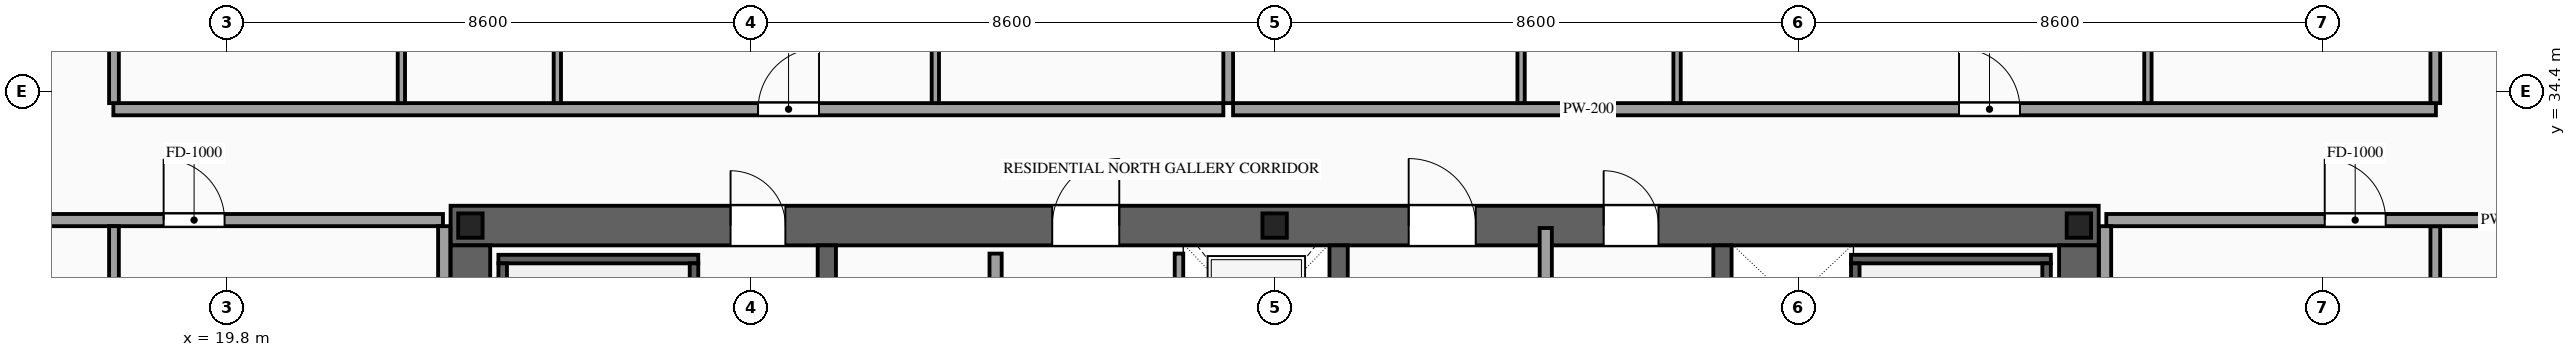
"""IFC4 building model, lengths in metres.
Left out: names, types, materials, properties, quantities, classifications, styles, units other than length and angle.
Written with IfcOpenShell. Run it as: python <this file> out.ifc"""

import sys

from ifc_helpers import new_model, si_unit, direction, frame, frame_2d, origin, origin_2d, place, context, subcontext, project, spatial, rectangle, i_section, extrude, source, transform, mapped, element, fill, save


model = new_model("IFC4")
c1 = context("Model", 3, precision=1e-05, world=origin(), true_north=direction((0.0, 1.0)))
c2 = subcontext(c1, "Body", "Model", "MODEL_VIEW")
j1 = project(units=[si_unit("LENGTHUNIT", "METRE"), si_unit("PLANEANGLEUNIT", "RADIAN")], contexts=[c1])
p1 = place(None, origin())
s1 = spatial("IfcSite", under=j1, at=p1, CompositionType="ELEMENT")
p2 = place(p1, origin())
s2 = spatial("IfcBuilding", under=s1, at=p2, CompositionType="ELEMENT")
p3 = place(p2, frame((0.0, 0.0, 212.5)))
s3 = spatial("IfcBuildingStorey", under=s2, at=p3, CompositionType="ELEMENT", Elevation=212.5)
p4 = place(p3, frame((23.475, 32.2, 0.0), z_axis=(0.0, 0.0, 1.0), x_axis=(1.0, 0.0, 0.0)))
e1 = element("IfcWall", 1, at=p4, inside=s3, PredefinedType="SHEAR", context=c2, shape_type="SweptSolid", body=[
    extrude(rectangle(XDim=27.05, YDim=0.65, at=frame_2d((13.525, 0.0))), origin(), (0.0, 0.0, 1.0), 3.5),
])
p5 = place(p4, frame((4.595, 0.0, 0.0)))
e2 = element("IfcOpeningElement", 2, at=p5, cuts=e1, PredefinedType="OPENING", context=c2, shape_type="SweptSolid", body=[
    extrude(rectangle(XDim=0.9, YDim=2.15, at=frame_2d((0.45, 1.075))), frame((0.0, 0.34, 0.0), z_axis=(0.0, -1.0, 0.0), x_axis=(1.0, 0.0, 0.0)), (0.0, 0.0, 1.0), 0.68),
])
p6 = place(p4, frame((9.875, 0.0, 0.0)))
e3 = element("IfcOpeningElement", 3, at=p6, cuts=e1, PredefinedType="OPENING", context=c2, shape_type="SweptSolid", body=[
    extrude(rectangle(XDim=1.1, YDim=2.2, at=frame_2d((0.55, 1.1))), frame((0.0, 0.34, 0.0), z_axis=(0.0, -1.0, 0.0), x_axis=(1.0, 0.0, 0.0)), (0.0, 0.0, 1.0), 0.68),
])
p7 = place(p4, frame((15.725, 0.0, 0.0)))
e4 = element("IfcOpeningElement", 4, at=p7, cuts=e1, PredefinedType="OPENING", context=c2, shape_type="SweptSolid", body=[
    extrude(rectangle(XDim=1.1, YDim=2.2, at=frame_2d((0.55, 1.1))), frame((0.0, 0.34, 0.0), z_axis=(0.0, -1.0, 0.0), x_axis=(1.0, 0.0, 0.0)), (0.0, 0.0, 1.0), 0.68),
])
p8 = place(p4, frame((18.925, 0.0, 0.0)))
e5 = element("IfcOpeningElement", 5, at=p8, cuts=e1, PredefinedType="OPENING", context=c2, shape_type="SweptSolid", body=[
    extrude(rectangle(XDim=0.9, YDim=2.15, at=frame_2d((0.45, 1.075))), frame((0.0, 0.34, 0.0), z_axis=(0.0, -1.0, 0.0), x_axis=(1.0, 0.0, 0.0)), (0.0, 0.0, 1.0), 0.68),
])
m1 = source(origin(), c2, "Body", "SweptSolid", [
    extrude(rectangle(XDim=12.15, YDim=0.65, at=frame_2d((6.075, 0.0))), origin(), (0.0, 0.0, 1.0), 3.5),
])
for number, where, z_axis, x_axis in (
    (6, (23.8, 19.725, 0.0), (0.0, 0.0, 1.0), (0.0, 1.0, 0.0)),
    (7, (50.2, 19.725, 0.0), (0.0, 0.0, 1.0), (0.0, 1.0, 0.0)),
):
    element("IfcWall", number, at=place(p3, frame(where, z_axis=z_axis, x_axis=x_axis)), inside=s3, PredefinedType="SHEAR", context=c2, shape_type="MappedRepresentation", body=[
        mapped(m1, transform((0.0, 0.0, 0.0), scale=1.0)),
    ])
m2 = source(origin(), c2, "Body", "SweptSolid", [
    extrude(rectangle(XDim=12.15, YDim=0.3, at=frame_2d((6.075, 0.0))), origin(), (0.0, 0.0, 1.0), 3.5),
])
for number, where, z_axis, x_axis in (
    (8, (29.65, 19.725, 0.0), (0.0, 0.0, 1.0), (0.0, 1.0, 0.0)),
    (9, (38.05, 19.725, 0.0), (0.0, 0.0, 1.0), (0.0, 1.0, 0.0)),
    (10, (44.35, 19.725, 0.0), (0.0, 0.0, 1.0), (0.0, 1.0, 0.0)),
):
    element("IfcWall", number, at=place(p3, frame(where, z_axis=z_axis, x_axis=x_axis)), inside=s3, PredefinedType="SOLIDWALL", context=c2, shape_type="MappedRepresentation", body=[
        mapped(m2, transform((0.0, 0.0, 0.0), scale=1.0)),
    ])
m3 = source(origin(), c2, "Body", "SweptSolid", [
    extrude(i_section(OverallWidth=0.4, OverallDepth=0.4, WebThickness=0.013, FlangeThickness=0.021, at=origin_2d()), origin(), (0.0, 0.0, 1.0), 3.5),
])
for number, where, z_axis, x_axis in (
    (11, (23.8, 32.2, 0.0), (0.0, 0.0, 1.0), (1.0, 0.0, 0.0)),
    (12, (37.0, 32.2, 0.0), (0.0, 0.0, 1.0), (1.0, 0.0, 0.0)),
    (13, (50.2, 32.2, 0.0), (0.0, 0.0, 1.0), (1.0, 0.0, 0.0)),
):
    element("IfcColumn", number, at=place(p3, frame(where, z_axis=z_axis, x_axis=x_axis)), inside=s3, PredefinedType="COLUMN", context=c2, shape_type="MappedRepresentation", body=[
        mapped(m3, transform((0.0, 0.0, 0.0), scale=1.0)),
    ])
p9 = place(p3, frame((35.43, 29.4, 0.0), z_axis=(0.0, 0.0, 1.0), x_axis=(0.0, 1.0, 0.0)))
e14 = element("IfcWall", 14, at=p9, inside=s3, PredefinedType="SOLIDWALL", context=c2, shape_type="SweptSolid", body=[
    extrude(rectangle(XDim=2.34, YDim=0.14, at=frame_2d((1.17, 0.0))), origin(), (0.0, 0.0, 1.0), 3.28),
])
p10 = place(p9, frame((0.62, 0.0, 0.0)))
e15 = element("IfcOpeningElement", 15, at=p10, cuts=e14, PredefinedType="OPENING", context=c2, shape_type="SweptSolid", body=[
    extrude(rectangle(XDim=1.1, YDim=2.2, at=frame_2d((0.55, 1.1))), frame((0.0, 0.085, 0.0), z_axis=(0.0, -1.0, 0.0), x_axis=(1.0, 0.0, 0.0)), (0.0, 0.0, 1.0), 0.17),
])
m4 = source(origin(), c2, "Body", "SweptSolid", [
    extrude(rectangle(XDim=3.28, YDim=0.14, at=frame_2d((1.64, 0.0))), origin(), (0.0, 0.0, 1.0), 3.28),
])
p11 = place(p3, frame((24.26, 31.65, 0.0), z_axis=(0.0, 0.0, 1.0), x_axis=(1.0, 0.0, 0.0)))
e16 = element("IfcWall", 16, at=p11, inside=s3, PredefinedType="SOLIDWALL", context=c2, shape_type="MappedRepresentation", body=[
    mapped(m4, transform((0.0, 0.0, 0.0), scale=1.0)),
])
m5 = source(origin(), c2, "Body", "SweptSolid", [
    extrude(rectangle(XDim=8.94, YDim=0.14, at=frame_2d((4.47, 0.0))), origin(), (0.0, 0.0, 1.0), 3.28),
])
for number, where, z_axis, x_axis in (
    (17, (24.33, 22.64, 0.0), (0.0, 0.0, 1.0), (0.0, 1.0, 0.0)),
    (18, (27.47, 22.64, 0.0), (0.0, 0.0, 1.0), (0.0, 1.0, 0.0)),
):
    element("IfcWall", number, at=place(p3, frame(where, z_axis=z_axis, x_axis=x_axis)), inside=s3, PredefinedType="SOLIDWALL", context=c2, shape_type="MappedRepresentation", body=[
        mapped(m5, transform((0.0, 0.0, 0.0), scale=1.0)),
    ])
p12 = place(p3, frame((46.46, 31.65, 0.0), z_axis=(0.0, 0.0, 1.0), x_axis=(1.0, 0.0, 0.0)))
e19 = element("IfcWall", 19, at=p12, inside=s3, PredefinedType="SOLIDWALL", context=c2, shape_type="MappedRepresentation", body=[
    mapped(m4, transform((0.0, 0.0, 0.0), scale=1.0)),
])
for number, where, z_axis, x_axis in (
    (20, (46.53, 22.64, 0.0), (0.0, 0.0, 1.0), (0.0, 1.0, 0.0)),
    (21, (49.67, 22.64, 0.0), (0.0, 0.0, 1.0), (0.0, 1.0, 0.0)),
):
    element("IfcWall", number, at=place(p3, frame(where, z_axis=z_axis, x_axis=x_axis)), inside=s3, PredefinedType="SOLIDWALL", context=c2, shape_type="MappedRepresentation", body=[
        mapped(m5, transform((0.0, 0.0, 0.0), scale=1.0)),
    ])
p13 = place(p3, frame((32.42, 24.05, 0.0), z_axis=(0.0, 0.0, 1.0), x_axis=(0.0, 1.0, 0.0)))
e22 = element("IfcWall", 22, at=p13, inside=s3, PredefinedType="PARTITIONING", context=c2, shape_type="SweptSolid", body=[
    extrude(rectangle(XDim=7.69, YDim=0.2, at=frame_2d((3.845, 0.0))), origin(), (0.0, 0.0, 1.0), 3.28),
])
p14 = place(p13, frame((3.395, 0.0, 0.0)))
e23 = element("IfcOpeningElement", 23, at=p14, cuts=e22, PredefinedType="OPENING", context=c2, shape_type="SweptSolid", body=[
    extrude(rectangle(XDim=0.9, YDim=2.15, at=frame_2d((0.45, 1.075))), frame((0.0, 0.115, 0.0), z_axis=(0.0, -1.0, 0.0), x_axis=(1.0, 0.0, 0.0)), (0.0, 0.0, 1.0), 0.23),
])
m6 = source(origin(), c2, "Body", "SweptSolid", [
    extrude(rectangle(XDim=5.96, YDim=0.2, at=frame_2d((2.98, 0.0))), origin(), (0.0, 0.0, 1.0), 3.28),
])
p15 = place(p3, frame((41.45, 26.2, 0.0), z_axis=(0.0, 0.0, 1.0), x_axis=(0.0, 1.0, 0.0)))
e24 = element("IfcWall", 24, at=p15, inside=s3, PredefinedType="PARTITIONING", context=c2, shape_type="MappedRepresentation", body=[
    mapped(m6, transform((0.0, 0.0, 0.0), scale=1.0)),
])
p16 = place(p3, frame((17.94, 34.11, 0.0), z_axis=(0.0, 0.0, 1.0), x_axis=(1.0, 0.0, 0.0)))
e25 = element("IfcWall", 25, at=p16, inside=s3, PredefinedType="PARTITIONING", context=c2, shape_type="SweptSolid", body=[
    extrude(rectangle(XDim=18.218, YDim=0.2, at=frame_2d((9.109, 0.0))), origin(), (0.0, 0.0, 1.0), 3.28),
])
p17 = place(p16, frame((10.582, 0.0, 0.0)))
e26 = element("IfcOpeningElement", 26, at=p17, cuts=e25, PredefinedType="OPENING", context=c2, shape_type="SweptSolid", body=[
    extrude(rectangle(XDim=1.0, YDim=2.2, at=frame_2d((0.5, 1.1))), frame((0.0, 0.115, 0.0), z_axis=(0.0, -1.0, 0.0), x_axis=(1.0, 0.0, 0.0)), (0.0, 0.0, 1.0), 0.23),
])
m7 = source(origin(), c2, "Body", "SweptSolid", [
    extrude(rectangle(XDim=13.54, YDim=0.16, at=frame_2d((6.77, 0.0))), origin(), (0.0, 0.0, 1.0), 3.28),
])
p18 = place(p3, frame((36.238, 34.21, 0.0), z_axis=(0.0, 0.0, 1.0), x_axis=(0.0, 1.0, 0.0)))
e27 = element("IfcWall", 27, at=p18, inside=s3, PredefinedType="PARTITIONING", context=c2, shape_type="MappedRepresentation", body=[
    mapped(m7, transform((0.0, 0.0, 0.0), scale=1.0)),
])
m8 = source(origin(), c2, "Body", "SweptSolid", [
    extrude(rectangle(XDim=5.61, YDim=0.12, at=frame_2d((2.805, 0.0))), origin(), (0.0, 0.0, 1.0), 3.28),
])
p19 = place(p3, frame((22.667, 34.21, 0.0), z_axis=(0.0, 0.0, 1.0), x_axis=(0.0, 1.0, 0.0)))
e28 = element("IfcWall", 28, at=p19, inside=s3, PredefinedType="PARTITIONING", context=c2, shape_type="MappedRepresentation", body=[
    mapped(m8, transform((0.0, 0.0, 0.0), scale=1.0)),
])
p20 = place(p3, frame((25.227, 34.21, 0.0), z_axis=(0.0, 0.0, 1.0), x_axis=(0.0, 1.0, 0.0)))
e29 = element("IfcWall", 29, at=p20, inside=s3, PredefinedType="PARTITIONING", context=c2, shape_type="SweptSolid", body=[
    extrude(rectangle(XDim=5.61, YDim=0.12, at=frame_2d((2.805, 0.0))), origin(), (0.0, 0.0, 1.0), 3.28),
])
p21 = place(p20, frame((2.38, 0.0, 0.0)))
e30 = element("IfcOpeningElement", 30, at=p21, cuts=e29, PredefinedType="OPENING", context=c2, shape_type="SweptSolid", body=[
    extrude(rectangle(XDim=0.85, YDim=2.1, at=frame_2d((0.425, 1.05))), frame((0.0, 0.075, 0.0), z_axis=(0.0, -1.0, 0.0), x_axis=(1.0, 0.0, 0.0)), (0.0, 0.0, 1.0), 0.15),
])
p22 = place(p3, frame((31.431, 34.21, 0.0), z_axis=(0.0, 0.0, 1.0), x_axis=(0.0, 1.0, 0.0)))
e31 = element("IfcWall", 31, at=p22, inside=s3, PredefinedType="PARTITIONING", context=c2, shape_type="MappedRepresentation", body=[
    mapped(m8, transform((0.0, 0.0, 0.0), scale=1.0)),
])
p23 = place(p3, frame((36.318, 34.11, 0.0), z_axis=(0.0, 0.0, 1.0), x_axis=(1.0, 0.0, 0.0)))
e32 = element("IfcWall", 32, at=p23, inside=s3, PredefinedType="PARTITIONING", context=c2, shape_type="SweptSolid", body=[
    extrude(rectangle(XDim=19.742, YDim=0.2, at=frame_2d((9.871, 0.0))), origin(), (0.0, 0.0, 1.0), 3.28),
])
p24 = place(p23, frame((11.915, 0.0, 0.0)))
e33 = element("IfcOpeningElement", 33, at=p24, cuts=e32, PredefinedType="OPENING", context=c2, shape_type="SweptSolid", body=[
    extrude(rectangle(XDim=1.0, YDim=2.2, at=frame_2d((0.5, 1.1))), frame((0.0, 0.115, 0.0), z_axis=(0.0, -1.0, 0.0), x_axis=(1.0, 0.0, 0.0)), (0.0, 0.0, 1.0), 0.23),
])
m9 = source(origin(), c2, "Body", "SweptSolid", [
    extrude(rectangle(XDim=13.39, YDim=0.16, at=frame_2d((6.695, 0.0))), origin(), (0.0, 0.0, 1.0), 3.28),
])
for number, where, z_axis, x_axis in (
    (34, (17.95, 34.21, 0.0), (0.0, 0.0, 1.0), (0.0, 1.0, 0.0)),
    (35, (56.05, 34.21, 0.0), (0.0, 0.0, 1.0), (0.0, 1.0, 0.0)),
):
    element("IfcWall", number, at=place(p3, frame(where, z_axis=z_axis, x_axis=x_axis)), inside=s3, PredefinedType="PARTITIONING", context=c2, shape_type="MappedRepresentation", body=[
        mapped(m9, transform((0.0, 0.0, 0.0), scale=1.0)),
    ])
p25 = place(p3, frame((41.045, 34.21, 0.0), z_axis=(0.0, 0.0, 1.0), x_axis=(0.0, 1.0, 0.0)))
e36 = element("IfcWall", 36, at=p25, inside=s3, PredefinedType="PARTITIONING", context=c2, shape_type="MappedRepresentation", body=[
    mapped(m8, transform((0.0, 0.0, 0.0), scale=1.0)),
])
p26 = place(p3, frame((43.605, 34.21, 0.0), z_axis=(0.0, 0.0, 1.0), x_axis=(0.0, 1.0, 0.0)))
e37 = element("IfcWall", 37, at=p26, inside=s3, PredefinedType="PARTITIONING", context=c2, shape_type="SweptSolid", body=[
    extrude(rectangle(XDim=5.61, YDim=0.12, at=frame_2d((2.805, 0.0))), origin(), (0.0, 0.0, 1.0), 3.28),
])
p27 = place(p26, frame((2.38, 0.0, 0.0)))
e38 = element("IfcOpeningElement", 38, at=p27, cuts=e37, PredefinedType="OPENING", context=c2, shape_type="SweptSolid", body=[
    extrude(rectangle(XDim=0.85, YDim=2.1, at=frame_2d((0.425, 1.05))), frame((0.0, 0.075, 0.0), z_axis=(0.0, -1.0, 0.0), x_axis=(1.0, 0.0, 0.0)), (0.0, 0.0, 1.0), 0.15),
])
p28 = place(p3, frame((51.333, 34.21, 0.0), z_axis=(0.0, 0.0, 1.0), x_axis=(0.0, 1.0, 0.0)))
e39 = element("IfcWall", 39, at=p28, inside=s3, PredefinedType="PARTITIONING", context=c2, shape_type="MappedRepresentation", body=[
    mapped(m8, transform((0.0, 0.0, 0.0), scale=1.0)),
])
p29 = place(p3, frame((15.05, 32.29, 0.0), z_axis=(0.0, 0.0, 1.0), x_axis=(1.0, 0.0, 0.0)))
e40 = element("IfcWall", 40, at=p29, inside=s3, PredefinedType="PARTITIONING", context=c2, shape_type="SweptSolid", body=[
    extrude(rectangle(XDim=8.3, YDim=0.2, at=frame_2d((4.15, 0.0))), origin(), (0.0, 0.0, 1.0), 2.775),
])
p30 = place(p29, frame((3.715, 0.0, 0.0)))
e41 = element("IfcOpeningElement", 41, at=p30, cuts=e40, PredefinedType="OPENING", context=c2, shape_type="SweptSolid", body=[
    extrude(rectangle(XDim=1.0, YDim=2.2, at=frame_2d((0.5, 1.1))), frame((0.0, 0.115, 0.0), z_axis=(0.0, -1.0, 0.0), x_axis=(1.0, 0.0, 0.0)), (0.0, 0.0, 1.0), 0.23),
])
m10 = source(origin(), c2, "Body", "SweptSolid", [
    extrude(rectangle(XDim=28.19, YDim=0.16, at=frame_2d((14.095, 0.0))), origin(), (0.0, 0.0, 1.0), 3.28),
])
for number, where, z_axis, x_axis in (
    (42, (17.95, 4.0, 0.0), (0.0, 0.0, 1.0), (0.0, 1.0, 0.0)),
    (43, (56.05, 4.0, 0.0), (0.0, 0.0, 1.0), (0.0, 1.0, 0.0)),
):
    element("IfcWall", number, at=place(p3, frame(where, z_axis=z_axis, x_axis=x_axis)), inside=s3, PredefinedType="PARTITIONING", context=c2, shape_type="MappedRepresentation", body=[
        mapped(m10, transform((0.0, 0.0, 0.0), scale=1.0)),
    ])
m11 = source(origin(), c2, "Body", "SweptSolid", [
    extrude(rectangle(XDim=6.29, YDim=0.2, at=frame_2d((3.145, 0.0))), origin(), (0.0, 0.0, 1.0), 3.28),
])
p31 = place(p3, frame((23.37, 25.9, 0.0), z_axis=(0.0, 0.0, 1.0), x_axis=(0.0, 1.0, 0.0)))
e44 = element("IfcWall", 44, at=p31, inside=s3, PredefinedType="PARTITIONING", context=c2, shape_type="MappedRepresentation", body=[
    mapped(m11, transform((0.0, 0.0, 0.0), scale=1.0)),
])
p32 = place(p3, frame((50.65, 32.29, 0.0), z_axis=(0.0, 0.0, 1.0), x_axis=(1.0, 0.0, 0.0)))
e45 = element("IfcWall", 45, at=p32, inside=s3, PredefinedType="PARTITIONING", context=c2, shape_type="SweptSolid", body=[
    extrude(rectangle(XDim=8.3, YDim=0.2, at=frame_2d((4.15, 0.0))), origin(), (0.0, 0.0, 1.0), 2.775),
])
p33 = place(p32, frame((3.585, 0.0, 0.0)))
e46 = element("IfcOpeningElement", 46, at=p33, cuts=e45, PredefinedType="OPENING", context=c2, shape_type="SweptSolid", body=[
    extrude(rectangle(XDim=1.0, YDim=2.2, at=frame_2d((0.5, 1.1))), frame((0.0, 0.115, 0.0), z_axis=(0.0, -1.0, 0.0), x_axis=(1.0, 0.0, 0.0)), (0.0, 0.0, 1.0), 0.23),
])
p34 = place(p3, frame((50.63, 25.9, 0.0), z_axis=(0.0, 0.0, 1.0), x_axis=(0.0, 1.0, 0.0)))
e47 = element("IfcWall", 47, at=p34, inside=s3, PredefinedType="PARTITIONING", context=c2, shape_type="MappedRepresentation", body=[
    mapped(m11, transform((0.0, 0.0, 0.0), scale=1.0)),
])
m12 = source(origin(), c2, "Body", "SweptSolid", [
    extrude(rectangle(XDim=0.9, YDim=2.15, at=frame_2d((0.45, 1.075))), frame((0.0, 0.025, 0.0), z_axis=(0.0, -1.0, 0.0), x_axis=(1.0, 0.0, 0.0)), (0.0, 0.0, 1.0), 0.05),
])
p35 = place(p5, origin())
e48 = element("IfcDoor", 48, at=p35, inside=s3, OperationType="SINGLE_SWING_LEFT", PredefinedType="DOOR", context=c2, shape_type="MappedRepresentation", body=[
    mapped(m12, transform((0.0, 0.0, 0.0), scale=1.0)),
])
fill(e2, e48)
m13 = source(origin(), c2, "Body", "SweptSolid", [
    extrude(rectangle(XDim=1.1, YDim=2.2, at=frame_2d((0.55, 1.1))), frame((0.0, 0.025, 0.0), z_axis=(0.0, -1.0, 0.0), x_axis=(1.0, 0.0, 0.0)), (0.0, 0.0, 1.0), 0.05),
])
p36 = place(p6, origin())
e49 = element("IfcDoor", 49, at=p36, inside=s3, OperationType="SINGLE_SWING_RIGHT", PredefinedType="DOOR", context=c2, shape_type="MappedRepresentation", body=[
    mapped(m13, transform((0.0, 0.0, 0.0), scale=1.0)),
])
fill(e3, e49)
p37 = place(p7, origin())
e50 = element("IfcDoor", 50, at=p37, inside=s3, OperationType="SINGLE_SWING_LEFT", PredefinedType="DOOR", context=c2, shape_type="MappedRepresentation", body=[
    mapped(m13, transform((0.0, 0.0, 0.0), scale=1.0)),
])
fill(e4, e50)
p38 = place(p8, origin())
e51 = element("IfcDoor", 51, at=p38, inside=s3, OperationType="SINGLE_SWING_LEFT", PredefinedType="DOOR", context=c2, shape_type="MappedRepresentation", body=[
    mapped(m12, transform((0.0, 0.0, 0.0), scale=1.0)),
])
fill(e5, e51)
m14 = source(origin(), c2, "Body", "SweptSolid", [
    extrude(rectangle(XDim=1.0, YDim=2.2, at=frame_2d((0.5, 1.1))), frame((0.0, 0.025, 0.0), z_axis=(0.0, -1.0, 0.0), x_axis=(1.0, 0.0, 0.0)), (0.0, 0.0, 1.0), 0.05),
])
p39 = place(p17, origin())
e52 = element("IfcDoor", 52, at=p39, inside=s3, OperationType="SINGLE_SWING_RIGHT", PredefinedType="DOOR", context=c2, shape_type="MappedRepresentation", body=[
    mapped(m14, transform((0.0, 0.0, 0.0), scale=1.0)),
])
fill(e26, e52)
p40 = place(p24, origin())
e53 = element("IfcDoor", 53, at=p40, inside=s3, OperationType="SINGLE_SWING_LEFT", PredefinedType="DOOR", context=c2, shape_type="MappedRepresentation", body=[
    mapped(m14, transform((0.0, 0.0, 0.0), scale=1.0)),
])
fill(e33, e53)
p41 = place(p30, origin())
e54 = element("IfcDoor", 54, at=p41, inside=s3, OperationType="SINGLE_SWING_LEFT", PredefinedType="DOOR", context=c2, shape_type="MappedRepresentation", body=[
    mapped(m14, transform((0.0, 0.0, 0.0), scale=1.0)),
])
fill(e41, e54)
p42 = place(p33, origin())
e55 = element("IfcDoor", 55, at=p42, inside=s3, OperationType="SINGLE_SWING_LEFT", PredefinedType="DOOR", context=c2, shape_type="MappedRepresentation", body=[
    mapped(m14, transform((0.0, 0.0, 0.0), scale=1.0)),
])
fill(e46, e55)
save(model, sys.argv[1])
